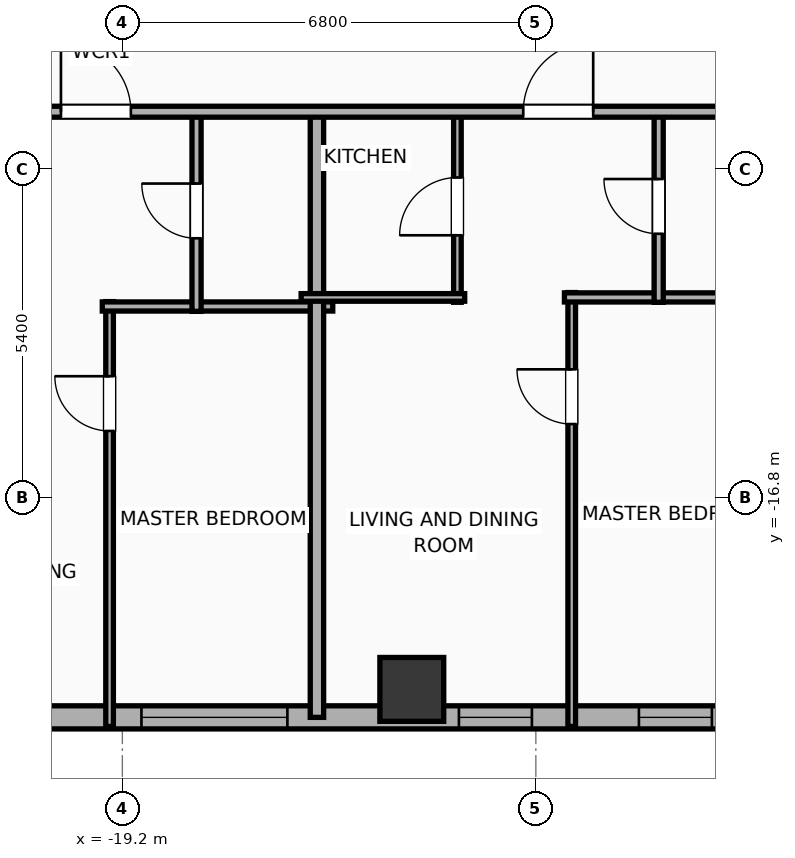
"""IFC4 building model, lengths in metres.
Left out: names, types, materials, properties, quantities, classifications, styles, units other than length and angle.
Written with IfcOpenShell. Run it as: python <this file> out.ifc"""

import sys

from ifc_helpers import new_model, si_unit, direction, frame, frame_2d, origin, origin_2d, place, context, subcontext, project, spatial, rectangle, hollow_rectangle, extrude, element, fill, save


model = new_model("IFC4")
c1 = context("Model", 3, precision=1e-05, world=origin(), true_north=direction((0.0, 1.0)))
c2 = subcontext(c1, "Body", "Model", "MODEL_VIEW")
j1 = project(units=[si_unit("LENGTHUNIT", "METRE"), si_unit("PLANEANGLEUNIT", "RADIAN")], contexts=[c1])
p1 = place(None, origin())
s1 = spatial("IfcSite", under=j1, at=p1, CompositionType="ELEMENT")
p2 = place(p1, origin())
s2 = spatial("IfcBuilding", under=s1, at=p2, CompositionType="ELEMENT")
p3 = place(p2, frame((0.0, 0.0, 93.6)))
s3 = spatial("IfcBuildingStorey", under=s2, at=p3, CompositionType="ELEMENT", Elevation=93.6)
p4 = place(p3, frame((-14.44, -19.95, 0.0), z_axis=(0.0, 0.0, 1.0), x_axis=(1.0, 0.0, 0.0)))
e1 = element("IfcColumn", 1, at=p4, inside=s3, PredefinedType="COLUMN", context=c2, shape_type="SweptSolid", body=[
    extrude(hollow_rectangle(XDim=1.05, YDim=1.05, WallThickness=0.036, at=origin_2d()), origin(), (0.0, 0.0, 1.0), 3.9),
])
p5 = place(p3, frame((29.381, -20.41, 0.0), z_axis=(0.0, 0.0, 1.0), x_axis=(-1.0, 0.0, 0.0)))
e2 = element("IfcWall", 2, at=p5, inside=s3, PredefinedType="ELEMENTEDWALL", context=c2, shape_type="SweptSolid", body=[
    extrude(rectangle(XDim=54.763, YDim=0.38, at=frame_2d((27.381, 0.0))), origin(), (0.0, 0.0, 1.0), 3.65),
])
p6 = place(p5, frame((4.795, 0.0, 0.75)))
e3 = element("IfcOpeningElement", 3, at=p6, cuts=e2, PredefinedType="OPENING", context=c2, shape_type="SweptSolid", body=[
    extrude(rectangle(XDim=2.4, YDim=2.1, at=frame_2d((1.2, 1.05))), frame((0.0, 0.2, 0.0), z_axis=(0.0, -1.0, 0.0), x_axis=(1.0, 0.0, 0.0)), (0.0, 0.0, 1.0), 0.4),
])
p7 = place(p5, frame((33.877, 0.0, 0.75)))
e4 = element("IfcOpeningElement", 4, at=p7, cuts=e2, PredefinedType="OPENING", context=c2, shape_type="SweptSolid", body=[
    extrude(rectangle(XDim=2.4, YDim=2.1, at=frame_2d((1.2, 1.05))), frame((0.0, 0.2, 0.0), z_axis=(0.0, -1.0, 0.0), x_axis=(1.0, 0.0, 0.0)), (0.0, 0.0, 1.0), 0.4),
])
p8 = place(p5, frame((45.867, 0.0, 0.75)))
e5 = element("IfcOpeningElement", 5, at=p8, cuts=e2, PredefinedType="OPENING", context=c2, shape_type="SweptSolid", body=[
    extrude(rectangle(XDim=2.4, YDim=2.1, at=frame_2d((1.2, 1.05))), frame((0.0, 0.2, 0.0), z_axis=(0.0, -1.0, 0.0), x_axis=(1.0, 0.0, 0.0)), (0.0, 0.0, 1.0), 0.4),
])
p9 = place(p5, frame((53.122, 0.0, 0.75)))
e6 = element("IfcOpeningElement", 6, at=p9, cuts=e2, PredefinedType="OPENING", context=c2, shape_type="SweptSolid", body=[
    extrude(rectangle(XDim=0.85, YDim=2.05, at=frame_2d((0.425, 1.025))), frame((0.0, 0.2, 0.0), z_axis=(0.0, -1.0, 0.0), x_axis=(1.0, 0.0, 0.0)), (0.0, 0.0, 1.0), 0.4),
])
p10 = place(p5, frame((50.286, 0.0, 0.75)))
e7 = element("IfcOpeningElement", 7, at=p10, cuts=e2, PredefinedType="OPENING", context=c2, shape_type="SweptSolid", body=[
    extrude(rectangle(XDim=1.2, YDim=2.05, at=frame_2d((0.6, 1.025))), frame((0.0, 0.2, 0.0), z_axis=(0.0, -1.0, 0.0), x_axis=(1.0, 0.0, 0.0)), (0.0, 0.0, 1.0), 0.4),
])
p11 = place(p5, frame((41.846, 0.0, 0.75)))
e8 = element("IfcOpeningElement", 8, at=p11, cuts=e2, PredefinedType="OPENING", context=c2, shape_type="SweptSolid", body=[
    extrude(rectangle(XDim=1.2, YDim=2.05, at=frame_2d((0.6, 1.025))), frame((0.0, 0.2, 0.0), z_axis=(0.0, -1.0, 0.0), x_axis=(1.0, 0.0, 0.0)), (0.0, 0.0, 1.0), 0.4),
])
p12 = place(p5, frame((38.886, 0.0, 0.75)))
e9 = element("IfcOpeningElement", 9, at=p12, cuts=e2, PredefinedType="OPENING", context=c2, shape_type="SweptSolid", body=[
    extrude(rectangle(XDim=1.2, YDim=2.05, at=frame_2d((0.6, 1.025))), frame((0.0, 0.2, 0.0), z_axis=(0.0, -1.0, 0.0), x_axis=(1.0, 0.0, 0.0)), (0.0, 0.0, 1.0), 0.4),
])
p13 = place(p5, frame((30.926, 0.0, 0.75)))
e10 = element("IfcOpeningElement", 10, at=p13, cuts=e2, PredefinedType="OPENING", context=c2, shape_type="SweptSolid", body=[
    extrude(rectangle(XDim=1.2, YDim=2.05, at=frame_2d((0.6, 1.025))), frame((0.0, 0.2, 0.0), z_axis=(0.0, -1.0, 0.0), x_axis=(1.0, 0.0, 0.0)), (0.0, 0.0, 1.0), 0.4),
])
p14 = place(p5, frame((27.486, 0.0, 0.75)))
e11 = element("IfcOpeningElement", 11, at=p14, cuts=e2, PredefinedType="OPENING", context=c2, shape_type="SweptSolid", body=[
    extrude(rectangle(XDim=1.2, YDim=2.05, at=frame_2d((0.6, 1.025))), frame((0.0, 0.2, 0.0), z_axis=(0.0, -1.0, 0.0), x_axis=(1.0, 0.0, 0.0)), (0.0, 0.0, 1.0), 0.4),
])
p15 = place(p5, frame((23.686, 0.0, 0.75)))
e12 = element("IfcOpeningElement", 12, at=p15, cuts=e2, PredefinedType="OPENING", context=c2, shape_type="SweptSolid", body=[
    extrude(rectangle(XDim=1.2, YDim=2.05, at=frame_2d((0.6, 1.025))), frame((0.0, 0.2, 0.0), z_axis=(0.0, -1.0, 0.0), x_axis=(1.0, 0.0, 0.0)), (0.0, 0.0, 1.0), 0.4),
])
p16 = place(p5, frame((19.886, 0.0, 0.75)))
e13 = element("IfcOpeningElement", 13, at=p16, cuts=e2, PredefinedType="OPENING", context=c2, shape_type="SweptSolid", body=[
    extrude(rectangle(XDim=1.2, YDim=2.05, at=frame_2d((0.6, 1.025))), frame((0.0, 0.2, 0.0), z_axis=(0.0, -1.0, 0.0), x_axis=(1.0, 0.0, 0.0)), (0.0, 0.0, 1.0), 0.4),
])
p17 = place(p5, frame((16.086, 0.0, 0.75)))
e14 = element("IfcOpeningElement", 14, at=p17, cuts=e2, PredefinedType="OPENING", context=c2, shape_type="SweptSolid", body=[
    extrude(rectangle(XDim=1.2, YDim=2.05, at=frame_2d((0.6, 1.025))), frame((0.0, 0.2, 0.0), z_axis=(0.0, -1.0, 0.0), x_axis=(1.0, 0.0, 0.0)), (0.0, 0.0, 1.0), 0.4),
])
p18 = place(p5, frame((12.286, 0.0, 0.75)))
e15 = element("IfcOpeningElement", 15, at=p18, cuts=e2, PredefinedType="OPENING", context=c2, shape_type="SweptSolid", body=[
    extrude(rectangle(XDim=1.2, YDim=2.05, at=frame_2d((0.6, 1.025))), frame((0.0, 0.2, 0.0), z_axis=(0.0, -1.0, 0.0), x_axis=(1.0, 0.0, 0.0)), (0.0, 0.0, 1.0), 0.4),
])
p19 = place(p5, frame((8.486, 0.0, 0.75)))
e16 = element("IfcOpeningElement", 16, at=p19, cuts=e2, PredefinedType="OPENING", context=c2, shape_type="SweptSolid", body=[
    extrude(rectangle(XDim=1.2, YDim=2.05, at=frame_2d((0.6, 1.025))), frame((0.0, 0.2, 0.0), z_axis=(0.0, -1.0, 0.0), x_axis=(1.0, 0.0, 0.0)), (0.0, 0.0, 1.0), 0.4),
])
p20 = place(p5, frame((2.277, 0.0, 0.75)))
e17 = element("IfcOpeningElement", 17, at=p20, cuts=e2, PredefinedType="OPENING", context=c2, shape_type="SweptSolid", body=[
    extrude(rectangle(XDim=1.2, YDim=2.05, at=frame_2d((0.6, 1.025))), frame((0.0, 0.2, 0.0), z_axis=(0.0, -1.0, 0.0), x_axis=(1.0, 0.0, 0.0)), (0.0, 0.0, 1.0), 0.4),
])
p21 = place(p5, frame((1.071, 0.0, 0.75)))
e18 = element("IfcOpeningElement", 18, at=p21, cuts=e2, PredefinedType="OPENING", context=c2, shape_type="SweptSolid", body=[
    extrude(rectangle(XDim=0.52, YDim=2.05, at=frame_2d((0.26, 1.025))), frame((0.0, 0.2, 0.0), z_axis=(0.0, -1.0, 0.0), x_axis=(1.0, 0.0, 0.0)), (0.0, 0.0, 1.0), 0.4),
])
p22 = place(p3, frame((-19.41, -20.56, 0.0), z_axis=(0.0, 0.0, 1.0), x_axis=(0.0, 1.0, 0.0)))
e19 = element("IfcWall", 19, at=p22, inside=s3, PredefinedType="PARTITIONING", context=c2, shape_type="SweptSolid", body=[
    extrude(rectangle(XDim=6.987, YDim=0.125, at=frame_2d((3.494, 0.0))), origin(), (0.0, 0.0, 1.0), 3.65),
])
p23 = place(p22, frame((4.86, 0.0, 0.0)))
e20 = element("IfcOpeningElement", 20, at=p23, cuts=e19, PredefinedType="OPENING", context=c2, shape_type="SweptSolid", body=[
    extrude(rectangle(XDim=0.9, YDim=2.05, at=frame_2d((0.45, 1.025))), frame((0.0, 0.073, 0.0), z_axis=(0.0, -1.0, 0.0), x_axis=(1.0, 0.0, 0.0)), (0.0, 0.0, 1.0), 0.145),
])
p24 = place(p3, frame((-19.53, -13.653, 0.0), z_axis=(0.0, 0.0, 1.0), x_axis=(1.0, 0.0, 0.0)))
e21 = element("IfcWall", 21, at=p24, inside=s3, PredefinedType="PLUMBINGWALL", context=c2, shape_type="SweptSolid", body=[
    extrude(rectangle(XDim=3.79, YDim=0.15, at=frame_2d((1.895, 0.0))), origin(), (0.0, 0.0, 1.0), 3.65),
])
p25 = place(p3, frame((-17.98, -13.733, 0.0), z_axis=(0.0, 0.0, 1.0), x_axis=(0.0, 1.0, 0.0)))
e22 = element("IfcWall", 22, at=p25, inside=s3, PredefinedType="PLUMBINGWALL", context=c2, shape_type="SweptSolid", body=[
    extrude(rectangle(XDim=3.303, YDim=0.15, at=frame_2d((1.651, 0.0))), origin(), (0.0, 0.0, 1.0), 3.65),
])
p26 = place(p25, frame((1.201, 0.0, 0.0)))
e23 = element("IfcOpeningElement", 23, at=p26, cuts=e22, PredefinedType="OPENING", context=c2, shape_type="SweptSolid", body=[
    extrude(rectangle(XDim=0.9, YDim=2.05, at=frame_2d((0.45, 1.025))), frame((0.0, 0.085, 0.0), z_axis=(0.0, -1.0, 0.0), x_axis=(1.0, 0.0, 0.0)), (0.0, 0.0, 1.0), 0.17),
])
p27 = place(p3, frame((-16.0, -20.41, 0.0), z_axis=(0.0, 0.0, 1.0), x_axis=(0.0, 1.0, 0.0)))
e24 = element("IfcWall", 24, at=p27, inside=s3, PredefinedType="PARTITIONING", context=c2, shape_type="SweptSolid", body=[
    extrude(rectangle(XDim=10.04, YDim=0.22, at=frame_2d((5.02, 0.0))), origin(), (0.0, 0.0, 1.0), 3.65),
])
p28 = place(p3, frame((-11.81, -20.56, 0.0), z_axis=(0.0, 0.0, 1.0), x_axis=(0.0, 1.0, 0.0)))
e25 = element("IfcWall", 25, at=p28, inside=s3, PredefinedType="PARTITIONING", context=c2, shape_type="SweptSolid", body=[
    extrude(rectangle(XDim=7.136, YDim=0.125, at=frame_2d((3.568, 0.0))), origin(), (0.0, 0.0, 1.0), 3.65),
])
p29 = place(p28, frame((4.973, 0.0, 0.0)))
e26 = element("IfcOpeningElement", 26, at=p29, cuts=e25, PredefinedType="OPENING", context=c2, shape_type="SweptSolid", body=[
    extrude(rectangle(XDim=0.9, YDim=2.05, at=frame_2d((0.45, 1.025))), frame((0.0, 0.073, 0.0), z_axis=(0.0, -1.0, 0.0), x_axis=(1.0, 0.0, 0.0)), (0.0, 0.0, 1.0), 0.145),
])
p30 = place(p3, frame((-11.93, -13.504, 0.0), z_axis=(0.0, 0.0, 1.0), x_axis=(1.0, 0.0, 0.0)))
e27 = element("IfcWall", 27, at=p30, inside=s3, PredefinedType="PLUMBINGWALL", context=c2, shape_type="SweptSolid", body=[
    extrude(rectangle(XDim=3.79, YDim=0.15, at=frame_2d((1.895, 0.0))), origin(), (0.0, 0.0, 1.0), 3.65),
])
p31 = place(p3, frame((-13.69, -13.584, 0.0), z_axis=(0.0, 0.0, 1.0), x_axis=(0.0, 1.0, 0.0)))
e28 = element("IfcWall", 28, at=p31, inside=s3, PredefinedType="PARTITIONING", context=c2, shape_type="SweptSolid", body=[
    extrude(rectangle(XDim=3.154, YDim=0.125, at=frame_2d((1.577, 0.0))), origin(), (0.0, 0.0, 1.0), 3.65),
])
p32 = place(p31, frame((1.102, 0.0, 0.0)))
e29 = element("IfcOpeningElement", 29, at=p32, cuts=e28, PredefinedType="OPENING", context=c2, shape_type="SweptSolid", body=[
    extrude(rectangle(XDim=0.95, YDim=2.05, at=frame_2d((0.475, 1.025))), frame((0.0, 0.073, 0.0), z_axis=(0.0, -1.0, 0.0), x_axis=(1.0, 0.0, 0.0)), (0.0, 0.0, 1.0), 0.145),
])
p33 = place(p3, frame((-16.26, -13.504, 0.0), z_axis=(0.0, 0.0, 1.0), x_axis=(1.0, 0.0, 0.0)))
e30 = element("IfcWall", 30, at=p33, inside=s3, PredefinedType="PARTITIONING", context=c2, shape_type="SweptSolid", body=[
    extrude(rectangle(XDim=2.69, YDim=0.125, at=frame_2d((1.345, 0.0))), origin(), (0.0, 0.0, 1.0), 3.65),
])
p34 = place(p3, frame((-10.38, -13.584, 0.0), z_axis=(0.0, 0.0, 1.0), x_axis=(0.0, 1.0, 0.0)))
e31 = element("IfcWall", 31, at=p34, inside=s3, PredefinedType="PLUMBINGWALL", context=c2, shape_type="SweptSolid", body=[
    extrude(rectangle(XDim=3.154, YDim=0.15, at=frame_2d((1.577, 0.0))), origin(), (0.0, 0.0, 1.0), 3.65),
])
p35 = place(p34, frame((1.127, 0.0, 0.0)))
e32 = element("IfcOpeningElement", 32, at=p35, cuts=e31, PredefinedType="OPENING", context=c2, shape_type="SweptSolid", body=[
    extrude(rectangle(XDim=0.9, YDim=2.05, at=frame_2d((0.45, 1.025))), frame((0.0, 0.085, 0.0), z_axis=(0.0, -1.0, 0.0), x_axis=(1.0, 0.0, 0.0)), (0.0, 0.0, 1.0), 0.17),
])
p36 = place(p3, frame((-29.21, -10.45, 0.0), z_axis=(0.0, 0.0, 1.0), x_axis=(1.0, 0.0, 0.0)))
e33 = element("IfcWall", 33, at=p36, inside=s3, PredefinedType="PARTITIONING", context=c2, shape_type="SweptSolid", body=[
    extrude(rectangle(XDim=62.42, YDim=0.18, at=frame_2d((31.21, 0.0))), origin(), (0.0, 0.0, 1.0), 3.65),
])
p37 = place(p36, frame((2.502, 0.0, 0.0)))
e34 = element("IfcOpeningElement", 34, at=p37, cuts=e33, PredefinedType="OPENING", context=c2, shape_type="SweptSolid", body=[
    extrude(rectangle(XDim=0.9, YDim=2.05, at=frame_2d((0.45, 1.025))), frame((0.0, 0.1, 0.0), z_axis=(0.0, -1.0, 0.0), x_axis=(1.0, 0.0, 0.0)), (0.0, 0.0, 1.0), 0.2),
])
p38 = place(p36, frame((9.0, 0.0, 0.0)))
e35 = element("IfcOpeningElement", 35, at=p38, cuts=e33, PredefinedType="OPENING", context=c2, shape_type="SweptSolid", body=[
    extrude(rectangle(XDim=1.15, YDim=2.05, at=frame_2d((0.575, 1.025))), frame((0.0, 0.1, 0.0), z_axis=(0.0, -1.0, 0.0), x_axis=(1.0, 0.0, 0.0)), (0.0, 0.0, 1.0), 0.2),
])
p39 = place(p36, frame((16.603, 0.0, 0.0)))
e36 = element("IfcOpeningElement", 36, at=p39, cuts=e33, PredefinedType="OPENING", context=c2, shape_type="SweptSolid", body=[
    extrude(rectangle(XDim=1.15, YDim=2.05, at=frame_2d((0.575, 1.025))), frame((0.0, 0.1, 0.0), z_axis=(0.0, -1.0, 0.0), x_axis=(1.0, 0.0, 0.0)), (0.0, 0.0, 1.0), 0.2),
])
p40 = place(p36, frame((24.199, 0.0, 0.0)))
e37 = element("IfcOpeningElement", 37, at=p40, cuts=e33, PredefinedType="OPENING", context=c2, shape_type="SweptSolid", body=[
    extrude(rectangle(XDim=1.15, YDim=2.05, at=frame_2d((0.575, 1.025))), frame((0.0, 0.1, 0.0), z_axis=(0.0, -1.0, 0.0), x_axis=(1.0, 0.0, 0.0)), (0.0, 0.0, 1.0), 0.2),
])
p41 = place(p36, frame((31.802, 0.0, 0.0)))
e38 = element("IfcOpeningElement", 38, at=p41, cuts=e33, PredefinedType="OPENING", context=c2, shape_type="SweptSolid", body=[
    extrude(rectangle(XDim=1.15, YDim=2.05, at=frame_2d((0.575, 1.025))), frame((0.0, 0.1, 0.0), z_axis=(0.0, -1.0, 0.0), x_axis=(1.0, 0.0, 0.0)), (0.0, 0.0, 1.0), 0.2),
])
p42 = place(p36, frame((39.399, 0.0, 0.0)))
e39 = element("IfcOpeningElement", 39, at=p42, cuts=e33, PredefinedType="OPENING", context=c2, shape_type="SweptSolid", body=[
    extrude(rectangle(XDim=1.15, YDim=2.05, at=frame_2d((0.575, 1.025))), frame((0.0, 0.1, 0.0), z_axis=(0.0, -1.0, 0.0), x_axis=(1.0, 0.0, 0.0)), (0.0, 0.0, 1.0), 0.2),
])
p43 = place(p36, frame((47.001, 0.0, 0.0)))
e40 = element("IfcOpeningElement", 40, at=p43, cuts=e33, PredefinedType="OPENING", context=c2, shape_type="SweptSolid", body=[
    extrude(rectangle(XDim=1.15, YDim=2.05, at=frame_2d((0.575, 1.025))), frame((0.0, 0.1, 0.0), z_axis=(0.0, -1.0, 0.0), x_axis=(1.0, 0.0, 0.0)), (0.0, 0.0, 1.0), 0.2),
])
p44 = place(p36, frame((52.363, 0.0, 0.0)))
e41 = element("IfcOpeningElement", 41, at=p44, cuts=e33, PredefinedType="OPENING", context=c2, shape_type="SweptSolid", body=[
    extrude(rectangle(XDim=1.15, YDim=2.05, at=frame_2d((0.575, 1.025))), frame((0.0, 0.1, 0.0), z_axis=(0.0, -1.0, 0.0), x_axis=(1.0, 0.0, 0.0)), (0.0, 0.0, 1.0), 0.2),
])
p45 = place(p36, frame((59.386, 0.0, 0.0)))
e42 = element("IfcOpeningElement", 42, at=p45, cuts=e33, PredefinedType="OPENING", context=c2, shape_type="SweptSolid", body=[
    extrude(rectangle(XDim=0.9, YDim=2.05, at=frame_2d((0.45, 1.025))), frame((0.0, 0.1, 0.0), z_axis=(0.0, -1.0, 0.0), x_axis=(1.0, 0.0, 0.0)), (0.0, 0.0, 1.0), 0.2),
])
p46 = place(p8, origin())
e43 = element("IfcWindow", 43, at=p46, inside=s3, PartitioningType="SINGLE_PANEL", PredefinedType="WINDOW", context=c2, shape_type="SweptSolid", body=[
    extrude(rectangle(XDim=2.4, YDim=2.1, at=frame_2d((1.2, 1.05))), frame((0.0, 0.03, 0.0), z_axis=(0.0, -1.0, 0.0), x_axis=(1.0, 0.0, 0.0)), (0.0, 0.0, 1.0), 0.06),
])
fill(e5, e43)
p47 = place(p11, origin())
e44 = element("IfcWindow", 44, at=p47, inside=s3, PartitioningType="SINGLE_PANEL", PredefinedType="WINDOW", context=c2, shape_type="SweptSolid", body=[
    extrude(rectangle(XDim=1.2, YDim=2.05, at=frame_2d((0.6, 1.025))), frame((0.0, 0.03, 0.0), z_axis=(0.0, -1.0, 0.0), x_axis=(1.0, 0.0, 0.0)), (0.0, 0.0, 1.0), 0.06),
])
fill(e8, e44)
p48 = place(p12, origin())
e45 = element("IfcWindow", 45, at=p48, inside=s3, PartitioningType="SINGLE_PANEL", PredefinedType="WINDOW", context=c2, shape_type="SweptSolid", body=[
    extrude(rectangle(XDim=1.2, YDim=2.05, at=frame_2d((0.6, 1.025))), frame((0.0, 0.03, 0.0), z_axis=(0.0, -1.0, 0.0), x_axis=(1.0, 0.0, 0.0)), (0.0, 0.0, 1.0), 0.06),
])
fill(e9, e45)
p49 = place(p23, origin())
e46 = element("IfcDoor", 46, at=p49, inside=s3, OperationType="SINGLE_SWING_RIGHT", PredefinedType="DOOR", context=c2, shape_type="SweptSolid", body=[
    extrude(rectangle(XDim=0.9, YDim=2.05, at=frame_2d((0.45, 1.025))), frame((0.0, 0.025, 0.0), z_axis=(0.0, -1.0, 0.0), x_axis=(1.0, 0.0, 0.0)), (0.0, 0.0, 1.0), 0.05),
])
fill(e20, e46)
p50 = place(p26, origin())
e47 = element("IfcDoor", 47, at=p50, inside=s3, OperationType="SINGLE_SWING_RIGHT", PredefinedType="DOOR", context=c2, shape_type="SweptSolid", body=[
    extrude(rectangle(XDim=0.9, YDim=2.05, at=frame_2d((0.45, 1.025))), frame((0.0, 0.025, 0.0), z_axis=(0.0, -1.0, 0.0), x_axis=(1.0, 0.0, 0.0)), (0.0, 0.0, 1.0), 0.05),
])
fill(e23, e47)
p51 = place(p29, origin())
e48 = element("IfcDoor", 48, at=p51, inside=s3, OperationType="SINGLE_SWING_RIGHT", PredefinedType="DOOR", context=c2, shape_type="SweptSolid", body=[
    extrude(rectangle(XDim=0.9, YDim=2.05, at=frame_2d((0.45, 1.025))), frame((0.0, 0.025, 0.0), z_axis=(0.0, -1.0, 0.0), x_axis=(1.0, 0.0, 0.0)), (0.0, 0.0, 1.0), 0.05),
])
fill(e26, e48)
p52 = place(p32, origin())
e49 = element("IfcDoor", 49, at=p52, inside=s3, OperationType="SINGLE_SWING_LEFT", PredefinedType="DOOR", context=c2, shape_type="SweptSolid", body=[
    extrude(rectangle(XDim=0.95, YDim=2.05, at=frame_2d((0.475, 1.025))), frame((0.0, 0.025, 0.0), z_axis=(0.0, -1.0, 0.0), x_axis=(1.0, 0.0, 0.0)), (0.0, 0.0, 1.0), 0.05),
])
fill(e29, e49)
p53 = place(p35, origin())
e50 = element("IfcDoor", 50, at=p53, inside=s3, OperationType="SINGLE_SWING_RIGHT", PredefinedType="DOOR", context=c2, shape_type="SweptSolid", body=[
    extrude(rectangle(XDim=0.9, YDim=2.05, at=frame_2d((0.45, 1.025))), frame((0.0, 0.025, 0.0), z_axis=(0.0, -1.0, 0.0), x_axis=(1.0, 0.0, 0.0)), (0.0, 0.0, 1.0), 0.05),
])
fill(e32, e50)
p54 = place(p38, origin())
e51 = element("IfcDoor", 51, at=p54, inside=s3, OperationType="SINGLE_SWING_LEFT", PredefinedType="DOOR", context=c2, shape_type="SweptSolid", body=[
    extrude(rectangle(XDim=1.15, YDim=2.05, at=frame_2d((0.575, 1.025))), frame((0.0, 0.025, 0.0), z_axis=(0.0, -1.0, 0.0), x_axis=(1.0, 0.0, 0.0)), (0.0, 0.0, 1.0), 0.05),
])
fill(e35, e51)
p55 = place(p39, origin())
e52 = element("IfcDoor", 52, at=p55, inside=s3, OperationType="SINGLE_SWING_RIGHT", PredefinedType="DOOR", context=c2, shape_type="SweptSolid", body=[
    extrude(rectangle(XDim=1.15, YDim=2.05, at=frame_2d((0.575, 1.025))), frame((0.0, 0.025, 0.0), z_axis=(0.0, -1.0, 0.0), x_axis=(1.0, 0.0, 0.0)), (0.0, 0.0, 1.0), 0.05),
])
fill(e36, e52)
save(model, sys.argv[1])
